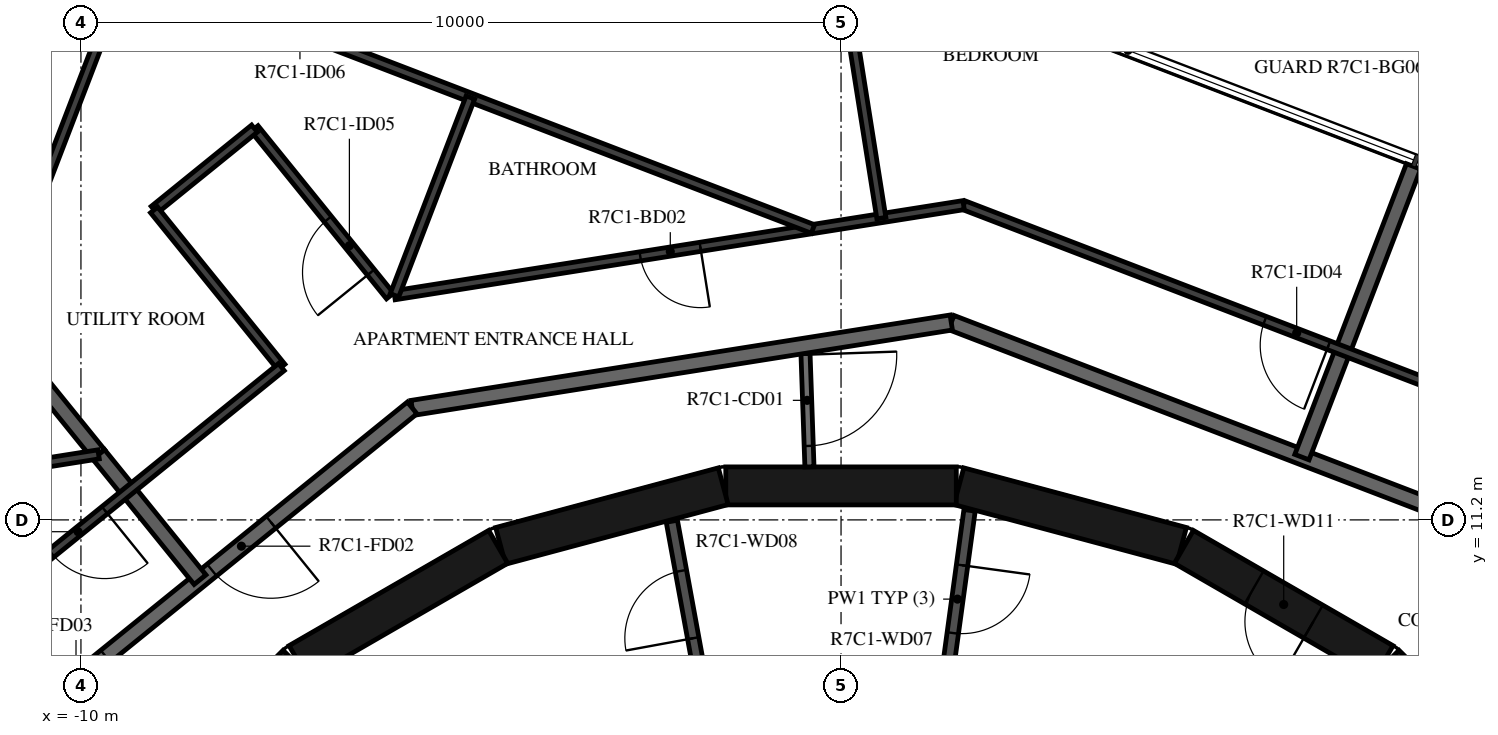
"""IFC4 building model, lengths in metres.
Left out: names, types, materials, properties, quantities, classifications, styles, units other than length and angle.
Written with IfcOpenShell. Run it as: python <this file> out.ifc"""

import sys

from ifc_helpers import new_model, si_unit, direction, frame, frame_2d, origin, place, context, subcontext, project, spatial, rectangle, extrude, element, fill, save


model = new_model("IFC4")
c1 = context("Model", 3, precision=1e-05, world=origin(), true_north=direction((0.0, 1.0)))
c2 = subcontext(c1, "Body", "Model", "MODEL_VIEW")
j1 = project(units=[si_unit("LENGTHUNIT", "METRE"), si_unit("PLANEANGLEUNIT", "RADIAN")], contexts=[c1])
p1 = place(None, origin())
s1 = spatial("IfcSite", under=j1, at=p1, CompositionType="ELEMENT")
p2 = place(p1, origin())
s2 = spatial("IfcBuilding", under=s1, at=p2, CompositionType="ELEMENT")
p3 = place(p2, frame((0.0, 0.0, 287.9)))
s3 = spatial("IfcBuildingStorey", under=s2, at=p3, CompositionType="ELEMENT", Elevation=287.9)
p4 = place(p3, frame((9.308, 7.164, 0.0), z_axis=(0.0, 0.0, 1.0), x_axis=(-0.707106781187, 0.707106781187, 0.0)))
e1 = element("IfcWall", 1, at=p4, inside=s3, PredefinedType="SHEAR", context=c2, shape_type="SweptSolid", body=[
    extrude(rectangle(XDim=3.032, YDim=0.5, at=frame_2d((1.516, 0.0))), origin(), (0.0, 0.0, 1.0), 3.05),
])
p5 = place(p4, frame((0.416, 0.0, 0.0)))
e2 = element("IfcOpeningElement", 2, at=p5, cuts=e1, PredefinedType="OPENING", context=c2, shape_type="SweptSolid", body=[
    extrude(rectangle(XDim=1.2, YDim=2.1, at=frame_2d((0.6, 1.05))), frame((0.0, 0.26, 0.0), z_axis=(0.0, -1.0, 0.0), x_axis=(1.0, 0.0, 0.0)), (0.0, 0.0, 1.0), 0.52),
])
p6 = place(p3, frame((7.137, 9.329, 0.0), z_axis=(0.0, 0.0, 1.0), x_axis=(-0.865975092491, 0.500087131594, 0.0)))
e3 = element("IfcWall", 3, at=p6, inside=s3, PredefinedType="SHEAR", context=c2, shape_type="SweptSolid", body=[
    extrude(rectangle(XDim=3.033, YDim=0.5, at=frame_2d((1.516, 0.0))), origin(), (0.0, 0.0, 1.0), 3.05),
])
p7 = place(p6, frame((1.066, 0.0, 0.0)))
e4 = element("IfcOpeningElement", 4, at=p7, cuts=e3, PredefinedType="OPENING", context=c2, shape_type="SweptSolid", body=[
    extrude(rectangle(XDim=0.9, YDim=2.1, at=frame_2d((0.45, 1.05))), frame((0.0, 0.26, 0.0), z_axis=(0.0, -1.0, 0.0), x_axis=(1.0, 0.0, 0.0)), (0.0, 0.0, 1.0), 0.52),
])
for number, where, z_axis, x_axis in (
    (5, (4.479, 10.858, 0.0), (0.0, 0.0, 1.0), (-0.966, 0.259, 0.0)),
    (6, (1.516, 11.647, 0.0), (0.0, 0.0, 1.0), (-1.0, 0.0, 0.0)),
    (7, (-1.55, 11.643, 0.0), (0.0, 0.0, 1.0), (-0.966, -0.259, 0.0)),
    (8, (-4.51, 10.845, 0.0), (0.0, 0.0, 1.0), (-0.866, -0.5, 0.0)),
):
    element("IfcWall", number, at=place(p3, frame(where, z_axis=z_axis, x_axis=x_axis)), inside=s3, PredefinedType="SHEAR", context=c2, shape_type="SweptSolid", body=[
        extrude(rectangle(XDim=3.033, YDim=0.5, at=frame_2d((1.516, 0.0))), origin(), (0.0, 0.0, 1.0), 3.05),
    ])
p8 = place(p3, frame((-7.164, 9.308, 0.0), z_axis=(0.0, 0.0, 1.0), x_axis=(-0.707106781187, -0.707106781187, 0.0)))
e9 = element("IfcWall", 9, at=p8, inside=s3, PredefinedType="SHEAR", context=c2, shape_type="SweptSolid", body=[
    extrude(rectangle(XDim=3.032, YDim=0.5, at=frame_2d((1.516, 0.0))), origin(), (0.0, 0.0, 1.0), 3.05),
])
p9 = place(p8, frame((1.416, 0.0, 0.0)))
e10 = element("IfcOpeningElement", 10, at=p9, cuts=e9, PredefinedType="OPENING", context=c2, shape_type="SweptSolid", body=[
    extrude(rectangle(XDim=1.2, YDim=2.1, at=frame_2d((0.6, 1.05))), frame((0.0, 0.26, 0.0), z_axis=(0.0, -1.0, 0.0), x_axis=(1.0, 0.0, 0.0)), (0.0, 0.0, 1.0), 0.52),
])
p10 = place(p3, frame((1.691, 11.326, 0.0), z_axis=(0.0, 0.0, 1.0), x_axis=(-0.135344253201, -0.990798633994, 0.0)))
e11 = element("IfcWall", 11, at=p10, inside=s3, PredefinedType="PARTITIONING", context=c2, shape_type="SweptSolid", body=[
    extrude(rectangle(XDim=2.358, YDim=0.15, at=frame_2d((1.179, 0.0))), origin(), (0.0, 0.0, 1.0), 3.05),
])
p11 = place(p10, frame((0.729, 0.0, 0.0)))
e12 = element("IfcOpeningElement", 12, at=p11, cuts=e11, PredefinedType="OPENING", context=c2, shape_type="SweptSolid", body=[
    extrude(rectangle(XDim=0.9, YDim=2.1, at=frame_2d((0.45, 1.05))), frame((0.0, 0.085, 0.0), z_axis=(0.0, -1.0, 0.0), x_axis=(1.0, 0.0, 0.0)), (0.0, 0.0, 1.0), 0.17),
])
p12 = place(p3, frame((-1.825, 8.99, 0.0), z_axis=(0.0, 0.0, 1.0), x_axis=(-0.179955206115, 0.983674805915, 0.0)))
e13 = element("IfcWall", 13, at=p12, inside=s3, PredefinedType="PARTITIONING", context=c2, shape_type="SweptSolid", body=[
    extrude(rectangle(XDim=2.229, YDim=0.15, at=frame_2d((1.115, 0.0))), origin(), (0.0, 0.0, 1.0), 3.05),
])
p13 = place(p12, frame((0.665, 0.0, 0.0)))
e14 = element("IfcOpeningElement", 14, at=p13, cuts=e13, PredefinedType="OPENING", context=c2, shape_type="SweptSolid", body=[
    extrude(rectangle(XDim=0.9, YDim=2.1, at=frame_2d((0.45, 1.05))), frame((0.0, 0.085, 0.0), z_axis=(0.0, -1.0, 0.0), x_axis=(1.0, 0.0, 0.0)), (0.0, 0.0, 1.0), 0.17),
])
p14 = place(p3, frame((-0.471, 13.492, 0.0), z_axis=(0.0, 0.0, 1.0), x_axis=(0.034873173869, -0.999391745886, 0.0)))
e15 = element("IfcWall", 15, at=p14, inside=s3, PredefinedType="PARTITIONING", context=c2, shape_type="SweptSolid", body=[
    extrude(rectangle(XDim=1.596, YDim=0.12, at=frame_2d((0.798, 0.0))), origin(), (0.0, 0.0, 1.0), 3.05),
])
p15 = place(p14, frame((0.12, 0.0, 0.0)))
e16 = element("IfcOpeningElement", 16, at=p15, cuts=e15, PredefinedType="OPENING", context=c2, shape_type="SweptSolid", body=[
    extrude(rectangle(XDim=1.2, YDim=2.1, at=frame_2d((0.6, 1.05))), frame((0.0, 0.07, 0.0), z_axis=(0.0, -1.0, 0.0), x_axis=(1.0, 0.0, 0.0)), (0.0, 0.0, 1.0), 0.14),
])
p16 = place(p3, frame((8.154, 11.223, 0.0), z_axis=(0.0, 0.0, 1.0), x_axis=(-0.93359073609, 0.358341090983, 0.0)))
e17 = element("IfcWall", 17, at=p16, inside=s3, PredefinedType="STANDARD", context=c2, shape_type="SweptSolid", body=[
    extrude(rectangle(XDim=7.181, YDim=0.2, at=frame_2d((3.59, 0.0))), origin(), (0.0, 0.0, 1.0), 3.05),
])
p17 = place(p3, frame((1.45, 13.797, 0.0), z_axis=(0.0, 0.0, 1.0), x_axis=(-0.987690361611, -0.156421704315, 0.0)))
e18 = element("IfcWall", 18, at=p17, inside=s3, PredefinedType="STANDARD", context=c2, shape_type="SweptSolid", body=[
    extrude(rectangle(XDim=7.181, YDim=0.2, at=frame_2d((3.591, 0.0))), origin(), (0.0, 0.0, 1.0), 3.05),
])
p18 = place(p3, frame((-5.643, 12.673, 0.0), z_axis=(0.0, 0.0, 1.0), x_axis=(-0.777160148113, -0.629302871585, 0.0)))
e19 = element("IfcWall", 19, at=p18, inside=s3, PredefinedType="STANDARD", context=c2, shape_type="SweptSolid", body=[
    extrude(rectangle(XDim=7.181, YDim=0.2, at=frame_2d((3.59, 0.0))), origin(), (0.0, 0.0, 1.0), 3.05),
])
p19 = place(p18, frame((2.39, 0.0, 0.0)))
e20 = element("IfcOpeningElement", 20, at=p19, cuts=e19, PredefinedType="OPENING", context=c2, shape_type="SweptSolid", body=[
    extrude(rectangle(XDim=1.0, YDim=2.1, at=frame_2d((0.5, 1.05))), frame((0.0, 0.11, 0.0), z_axis=(0.0, -1.0, 0.0), x_axis=(1.0, 0.0, 0.0)), (0.0, 0.0, 1.0), 0.22),
])
p20 = place(p18, frame((5.19, 0.0, 0.0)))
e21 = element("IfcOpeningElement", 21, at=p20, cuts=e19, PredefinedType="OPENING", context=c2, shape_type="SweptSolid", body=[
    extrude(rectangle(XDim=1.0, YDim=2.1, at=frame_2d((0.5, 1.05))), frame((0.0, 0.11, 0.0), z_axis=(0.0, -1.0, 0.0), x_axis=(1.0, 0.0, 0.0)), (0.0, 0.0, 1.0), 0.22),
])
p21 = place(p3, frame((7.532, 15.85, 0.0), z_axis=(0.0, 0.0, 1.0), x_axis=(-0.358355996975, -0.933585014571, 0.0)))
e22 = element("IfcWall", 22, at=p21, inside=s3, PredefinedType="STANDARD", context=c2, shape_type="SweptSolid", body=[
    extrude(rectangle(XDim=4.096, YDim=0.2, at=frame_2d((2.048, 0.0))), origin(), (0.0, 0.0, 1.0), 3.05),
])
p22 = place(p3, frame((-9.768, 12.062, 0.0), z_axis=(0.0, 0.0, 1.0), x_axis=(0.629274383598, -0.777183215302, 0.0)))
e23 = element("IfcWall", 23, at=p22, inside=s3, PredefinedType="STANDARD", context=c2, shape_type="SweptSolid", body=[
    extrude(rectangle(XDim=2.121, YDim=0.2, at=frame_2d((1.061, 0.0))), origin(), (0.0, 0.0, 1.0), 3.05),
])
p23 = place(p3, frame((-10.779, 13.311, 0.0), z_axis=(0.0, 0.0, 1.0), x_axis=(0.629373100483, -0.77710327524, 0.0)))
e24 = element("IfcWall", 24, at=p23, inside=s3, PredefinedType="STANDARD", context=c2, shape_type="SweptSolid", body=[
    extrude(rectangle(XDim=1.606, YDim=0.2, at=frame_2d((0.803, 0.0))), origin(), (0.0, 0.0, 1.0), 3.05),
])
p24 = place(p3, frame((9.067, 12.479, 0.0), z_axis=(0.0, 0.0, 1.0), x_axis=(-0.933579449035, 0.358370495911, 0.0)))
e25 = element("IfcWall", 25, at=p24, inside=s3, PredefinedType="PARTITIONING", context=c2, shape_type="SweptSolid", body=[
    extrude(rectangle(XDim=7.985, YDim=0.12, at=frame_2d((3.992, 0.0))), origin(), (0.0, 0.0, 1.0), 3.05),
])
p25 = place(p24, frame((2.841, 0.0, 0.0)))
e26 = element("IfcOpeningElement", 26, at=p25, cuts=e25, PredefinedType="OPENING", context=c2, shape_type="SweptSolid", body=[
    extrude(rectangle(XDim=0.9, YDim=2.1, at=frame_2d((0.45, 1.05))), frame((0.0, 0.07, 0.0), z_axis=(0.0, -1.0, 0.0), x_axis=(1.0, 0.0, 0.0)), (0.0, 0.0, 1.0), 0.14),
])
p26 = place(p3, frame((1.612, 15.341, 0.0), z_axis=(0.0, 0.0, 1.0), x_axis=(-0.987690790621, -0.156418995404, 0.0)))
e27 = element("IfcWall", 27, at=p26, inside=s3, PredefinedType="PARTITIONING", context=c2, shape_type="SweptSolid", body=[
    extrude(rectangle(XDim=7.581, YDim=0.12, at=frame_2d((3.791, 0.0))), origin(), (0.0, 0.0, 1.0), 3.05),
])
p27 = place(p26, frame((3.507, 0.0, 0.0)))
e28 = element("IfcOpeningElement", 28, at=p27, cuts=e27, PredefinedType="OPENING", context=c2, shape_type="SweptSolid", body=[
    extrude(rectangle(XDim=0.8, YDim=2.1, at=frame_2d((0.4, 1.05))), frame((0.0, 0.07, 0.0), z_axis=(0.0, -1.0, 0.0), x_axis=(1.0, 0.0, 0.0)), (0.0, 0.0, 1.0), 0.14),
])
p28 = place(p3, frame((-5.933, 14.146, 0.0), z_axis=(0.0, 0.0, 1.0), x_axis=(-0.62930727886, 0.777156579316, 0.0)))
e29 = element("IfcWall", 29, at=p28, inside=s3, PredefinedType="PARTITIONING", context=c2, shape_type="SweptSolid", body=[
    extrude(rectangle(XDim=2.833, YDim=0.12, at=frame_2d((1.417, 0.0))), origin(), (0.0, 0.0, 1.0), 3.05),
])
p29 = place(p28, frame((0.4, 0.0, 0.0)))
e30 = element("IfcOpeningElement", 30, at=p29, cuts=e29, PredefinedType="OPENING", context=c2, shape_type="SweptSolid", body=[
    extrude(rectangle(XDim=0.9, YDim=2.1, at=frame_2d((0.45, 1.05))), frame((0.0, 0.07, 0.0), z_axis=(0.0, -1.0, 0.0), x_axis=(1.0, 0.0, 0.0)), (0.0, 0.0, 1.0), 0.14),
])
p30 = place(p3, frame((-7.717, 16.348, 0.0), z_axis=(0.0, 0.0, 1.0), x_axis=(-0.777184671515, -0.629272585103, 0.0)))
e31 = element("IfcWall", 31, at=p30, inside=s3, PredefinedType="PARTITIONING", context=c2, shape_type="SweptSolid", body=[
    extrude(rectangle(XDim=1.7, YDim=0.12, at=frame_2d((0.85, 0.0))), origin(), (0.0, 0.0, 1.0), 3.05),
])
p31 = place(p3, frame((-9.038, 15.278, 0.0), z_axis=(0.0, 0.0, 1.0), x_axis=(0.629338090938, -0.777131628037, 0.0)))
e32 = element("IfcWall", 32, at=p31, inside=s3, PredefinedType="PARTITIONING", context=c2, shape_type="SweptSolid", body=[
    extrude(rectangle(XDim=2.661, YDim=0.12, at=frame_2d((1.331, 0.0))), origin(), (0.0, 0.0, 1.0), 3.05),
])
p32 = place(p3, frame((-7.363, 13.21, 0.0), z_axis=(0.0, 0.0, 1.0), x_axis=(-0.777139504663, -0.629328364443, 0.0)))
e33 = element("IfcWall", 33, at=p32, inside=s3, PredefinedType="PARTITIONING", context=c2, shape_type="SweptSolid", body=[
    extrude(rectangle(XDim=6.584, YDim=0.12, at=frame_2d((3.292, 0.0))), origin(), (0.0, 0.0, 1.0), 3.05),
])
p33 = place(p32, frame((2.991, 0.0, 0.0)))
e34 = element("IfcOpeningElement", 34, at=p33, cuts=e33, PredefinedType="OPENING", context=c2, shape_type="SweptSolid", body=[
    extrude(rectangle(XDim=0.9, YDim=2.1, at=frame_2d((0.45, 1.05))), frame((0.0, 0.07, 0.0), z_axis=(0.0, -1.0, 0.0), x_axis=(1.0, 0.0, 0.0)), (0.0, 0.0, 1.0), 0.14),
])
p34 = place(p3, frame((-0.037, 18.756, 0.0), z_axis=(0.0, 0.0, 1.0), x_axis=(0.156421851095, -0.987690338365, 0.0)))
e35 = element("IfcWall", 35, at=p34, inside=s3, PredefinedType="PARTITIONING", context=c2, shape_type="SweptSolid", body=[
    extrude(rectangle(XDim=3.63, YDim=0.12, at=frame_2d((1.815, 0.0))), origin(), (0.0, 0.0, 1.0), 3.05),
])
p35 = place(p3, frame((-10.18, 18.793, 0.0), z_axis=(0.0, 0.0, 1.0), x_axis=(0.933574148929, -0.358384302742, 0.0)))
e36 = element("IfcWall", 36, at=p35, inside=s3, PredefinedType="PARTITIONING", context=c2, shape_type="SweptSolid", body=[
    extrude(rectangle(XDim=10.509, YDim=0.12, at=frame_2d((5.254, 0.0))), origin(), (0.0, 0.0, 1.0), 3.05),
])
p36 = place(p35, frame((2.829, 0.0, 0.0)))
e37 = element("IfcOpeningElement", 37, at=p36, cuts=e36, PredefinedType="OPENING", context=c2, shape_type="SweptSolid", body=[
    extrude(rectangle(XDim=0.9, YDim=2.1, at=frame_2d((0.45, 1.05))), frame((0.0, 0.07, 0.0), z_axis=(0.0, -1.0, 0.0), x_axis=(1.0, 0.0, 0.0)), (0.0, 0.0, 1.0), 0.14),
])
p37 = place(p3, frame((-4.876, 16.757, 0.0), z_axis=(0.0, 0.0, 1.0), x_axis=(-0.358380240487, -0.933575708354, 0.0)))
e38 = element("IfcWall", 38, at=p37, inside=s3, PredefinedType="PARTITIONING", context=c2, shape_type="SweptSolid", body=[
    extrude(rectangle(XDim=2.787, YDim=0.12, at=frame_2d((1.394, 0.0))), origin(), (0.0, 0.0, 1.0), 3.05),
])
p38 = place(p3, frame((-9.383, 18.487, 0.0), z_axis=(0.0, 0.0, 1.0), x_axis=(-0.358340198137, -0.933591078792, 0.0)))
e39 = element("IfcWall", 39, at=p38, inside=s3, PredefinedType="PARTITIONING", context=c2, shape_type="SweptSolid", body=[
    extrude(rectangle(XDim=3.125, YDim=0.12, at=frame_2d((1.562, 0.0))), origin(), (0.0, 0.0, 1.0), 3.05),
])
p39 = place(p38, frame((0.2, 0.0, 0.0)))
e40 = element("IfcOpeningElement", 40, at=p39, cuts=e39, PredefinedType="OPENING", context=c2, shape_type="SweptSolid", body=[
    extrude(rectangle(XDim=0.9, YDim=2.1, at=frame_2d((0.45, 1.05))), frame((0.0, 0.07, 0.0), z_axis=(0.0, -1.0, 0.0), x_axis=(1.0, 0.0, 0.0)), (0.0, 0.0, 1.0), 0.14),
])
p40 = place(p3, frame((-15.828, 11.102, 0.0), z_axis=(0.0, 0.0, 1.0), x_axis=(0.98768671358, 0.156444737262, 0.0)))
e41 = element("IfcWall", 41, at=p40, inside=s3, PredefinedType="PARTITIONING", context=c2, shape_type="SweptSolid", body=[
    extrude(rectangle(XDim=6.136, YDim=0.12, at=frame_2d((3.068, 0.0))), origin(), (0.0, 0.0, 1.0), 3.05),
])
p41 = place(p40, frame((0.2, 0.0, 0.0)))
e42 = element("IfcOpeningElement", 42, at=p41, cuts=e41, PredefinedType="OPENING", context=c2, shape_type="SweptSolid", body=[
    extrude(rectangle(XDim=0.9, YDim=2.1, at=frame_2d((0.45, 1.05))), frame((0.0, 0.07, 0.0), z_axis=(0.0, -1.0, 0.0), x_axis=(1.0, 0.0, 0.0)), (0.0, 0.0, 1.0), 0.14),
])
p42 = place(p11, origin())
e43 = element("IfcDoor", 43, at=p42, inside=s3, OperationType="SINGLE_SWING_LEFT", PredefinedType="DOOR", context=c2, shape_type="SweptSolid", body=[
    extrude(rectangle(XDim=0.9, YDim=2.1, at=frame_2d((0.45, 1.05))), frame((0.0, 0.025, 0.0), z_axis=(0.0, -1.0, 0.0), x_axis=(1.0, 0.0, 0.0)), (0.0, 0.0, 1.0), 0.05),
])
fill(e12, e43)
p43 = place(p13, origin())
e44 = element("IfcDoor", 44, at=p43, inside=s3, OperationType="SINGLE_SWING_RIGHT", PredefinedType="DOOR", context=c2, shape_type="SweptSolid", body=[
    extrude(rectangle(XDim=0.9, YDim=2.1, at=frame_2d((0.45, 1.05))), frame((0.0, 0.025, 0.0), z_axis=(0.0, -1.0, 0.0), x_axis=(1.0, 0.0, 0.0)), (0.0, 0.0, 1.0), 0.05),
])
fill(e14, e44)
p44 = place(p7, origin())
e45 = element("IfcDoor", 45, at=p44, inside=s3, OperationType="SINGLE_SWING_LEFT", PredefinedType="DOOR", context=c2, shape_type="SweptSolid", body=[
    extrude(rectangle(XDim=0.9, YDim=2.1, at=frame_2d((0.45, 1.05))), frame((0.0, 0.025, 0.0), z_axis=(0.0, -1.0, 0.0), x_axis=(1.0, 0.0, 0.0)), (0.0, 0.0, 1.0), 0.05),
])
fill(e4, e45)
p45 = place(p19, origin())
e46 = element("IfcDoor", 46, at=p45, inside=s3, OperationType="SINGLE_SWING_RIGHT", PredefinedType="DOOR", context=c2, shape_type="SweptSolid", body=[
    extrude(rectangle(XDim=1.0, YDim=2.1, at=frame_2d((0.5, 1.05))), frame((0.0, 0.025, 0.0), z_axis=(0.0, -1.0, 0.0), x_axis=(1.0, 0.0, 0.0)), (0.0, 0.0, 1.0), 0.05),
])
fill(e20, e46)
p46 = place(p25, origin())
e47 = element("IfcDoor", 47, at=p46, inside=s3, OperationType="SINGLE_SWING_LEFT", PredefinedType="DOOR", context=c2, shape_type="SweptSolid", body=[
    extrude(rectangle(XDim=0.9, YDim=2.1, at=frame_2d((0.45, 1.05))), frame((0.0, 0.025, 0.0), z_axis=(0.0, -1.0, 0.0), x_axis=(1.0, 0.0, 0.0)), (0.0, 0.0, 1.0), 0.05),
])
fill(e26, e47)
p47 = place(p27, origin())
e48 = element("IfcDoor", 48, at=p47, inside=s3, OperationType="SINGLE_SWING_RIGHT", PredefinedType="DOOR", context=c2, shape_type="SweptSolid", body=[
    extrude(rectangle(XDim=0.8, YDim=2.1, at=frame_2d((0.4, 1.05))), frame((0.0, 0.025, 0.0), z_axis=(0.0, -1.0, 0.0), x_axis=(1.0, 0.0, 0.0)), (0.0, 0.0, 1.0), 0.05),
])
fill(e28, e48)
p48 = place(p29, origin())
e49 = element("IfcDoor", 49, at=p48, inside=s3, OperationType="SINGLE_SWING_RIGHT", PredefinedType="DOOR", context=c2, shape_type="SweptSolid", body=[
    extrude(rectangle(XDim=0.9, YDim=2.1, at=frame_2d((0.45, 1.05))), frame((0.0, 0.025, 0.0), z_axis=(0.0, -1.0, 0.0), x_axis=(1.0, 0.0, 0.0)), (0.0, 0.0, 1.0), 0.05),
])
fill(e30, e49)
p49 = place(p20, origin())
e50 = element("IfcDoor", 50, at=p49, inside=s3, OperationType="SINGLE_SWING_LEFT", PredefinedType="DOOR", context=c2, shape_type="SweptSolid", body=[
    extrude(rectangle(XDim=1.0, YDim=2.1, at=frame_2d((0.5, 1.05))), frame((0.0, 0.025, 0.0), z_axis=(0.0, -1.0, 0.0), x_axis=(1.0, 0.0, 0.0)), (0.0, 0.0, 1.0), 0.05),
])
fill(e21, e50)
p50 = place(p33, origin())
e51 = element("IfcDoor", 51, at=p50, inside=s3, OperationType="SINGLE_SWING_LEFT", PredefinedType="DOOR", context=c2, shape_type="SweptSolid", body=[
    extrude(rectangle(XDim=0.9, YDim=2.1, at=frame_2d((0.45, 1.05))), frame((0.0, 0.025, 0.0), z_axis=(0.0, -1.0, 0.0), x_axis=(1.0, 0.0, 0.0)), (0.0, 0.0, 1.0), 0.05),
])
fill(e34, e51)
p51 = place(p15, origin())
e52 = element("IfcDoor", 52, at=p51, inside=s3, OperationType="DOUBLE_DOOR_SINGLE_SWING", PredefinedType="DOOR", context=c2, shape_type="SweptSolid", body=[
    extrude(rectangle(XDim=1.2, YDim=2.1, at=frame_2d((0.6, 1.05))), frame((0.0, 0.025, 0.0), z_axis=(0.0, -1.0, 0.0), x_axis=(1.0, 0.0, 0.0)), (0.0, 0.0, 1.0), 0.05),
])
fill(e16, e52)
save(model, sys.argv[1])
